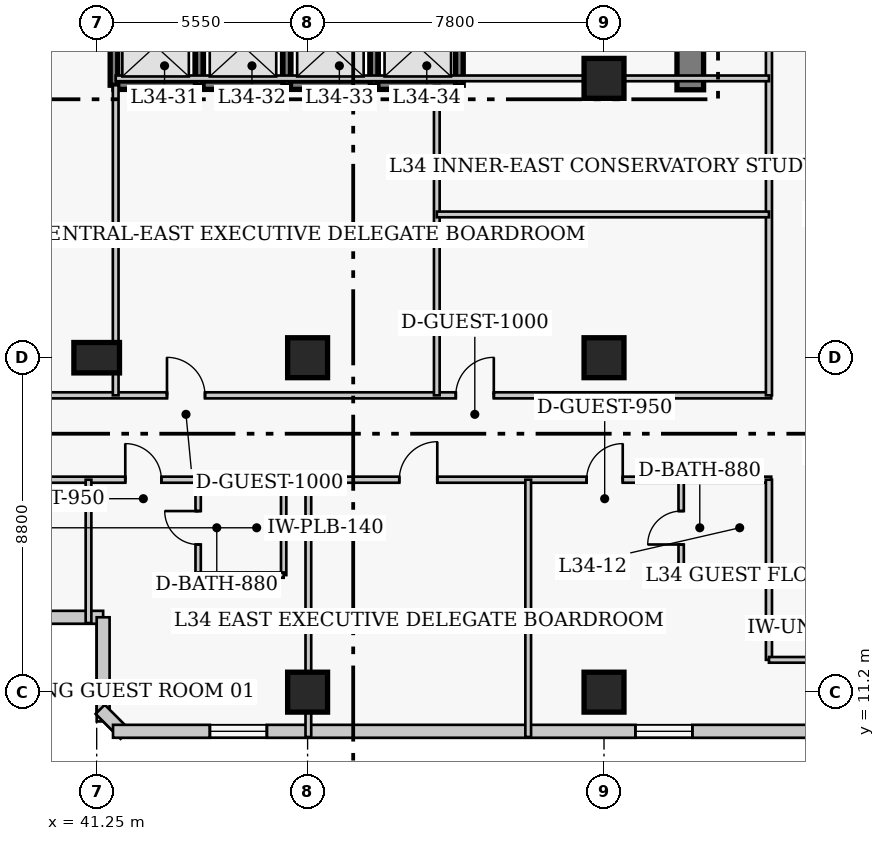
"""IFC4 building model, lengths in metres.
Left out: names, types, materials, properties, quantities, classifications, styles, units other than length and angle.
Written with IfcOpenShell. Run it as: python <this file> out.ifc"""

import sys

from ifc_helpers import new_model, si_unit, direction, frame, frame_2d, origin, origin_2d, place, context, subcontext, project, spatial, rectangle, extrude, element, fill, save


model = new_model("IFC4")
c1 = context("Model", 3, precision=1e-05, world=origin(), true_north=direction((0.0, 1.0)))
c2 = subcontext(c1, "Body", "Model", "MODEL_VIEW")
j1 = project(units=[si_unit("LENGTHUNIT", "METRE"), si_unit("PLANEANGLEUNIT", "RADIAN")], contexts=[c1])
p1 = place(None, origin())
s1 = spatial("IfcSite", under=j1, at=p1, CompositionType="ELEMENT")
p2 = place(p1, origin())
s2 = spatial("IfcBuilding", under=s1, at=p2, CompositionType="ELEMENT")
p3 = place(p2, frame((0.0, 0.0, 138.4)))
s3 = spatial("IfcBuildingStorey", under=s2, at=p3, CompositionType="ELEMENT", Elevation=138.4)
p4 = place(p3, frame((56.87, 27.05, 0.0), z_axis=(0.0, 0.0, 1.0), x_axis=(0.0, 1.0, 0.0)))
e1 = element("IfcWall", 1, at=p4, inside=s3, PredefinedType="SHEAR", context=c2, shape_type="SweptSolid", body=[
    extrude(rectangle(XDim=13.62, YDim=0.7, at=frame_2d((6.81, 0.0))), origin(), (0.0, 0.0, 1.0), 3.8),
])
p5 = place(p3, frame((41.25, 20.0, 0.0), z_axis=(0.0, 0.0, 1.0), x_axis=(1.0, 0.0, 0.0)))
e2 = element("IfcColumn", 2, at=p5, inside=s3, PredefinedType="COLUMN", context=c2, shape_type="SweptSolid", body=[
    extrude(rectangle(XDim=1.2, YDim=0.8, at=origin_2d()), origin(), (0.0, 0.0, 1.0), 3.8),
])
for number, where, z_axis, x_axis in (
    (3, (46.8, 11.2, 0.0), (0.0, 0.0, 1.0), (1.0, 0.0, 0.0)),
    (4, (46.8, 20.0, 0.0), (0.0, 0.0, 1.0), (1.0, 0.0, 0.0)),
    (5, (54.6, 11.2, 0.0), (0.0, 0.0, 1.0), (1.0, 0.0, 0.0)),
    (6, (54.6, 20.0, 0.0), (0.0, 0.0, 1.0), (1.0, 0.0, 0.0)),
    (7, (54.6, 27.35, 0.0), (0.0, 0.0, 1.0), (1.0, 0.0, 0.0)),
):
    element("IfcColumn", number, at=place(p3, frame(where, z_axis=z_axis, x_axis=x_axis)), inside=s3, PredefinedType="COLUMN", context=c2, shape_type="SweptSolid", body=[
        extrude(rectangle(XDim=1.05, YDim=1.05, at=origin_2d()), origin(), (0.0, 0.0, 1.0), 3.8),
    ])
p6 = place(p3, frame((36.58, 13.17, 0.0), z_axis=(0.0, 0.0, 1.0), x_axis=(1.0, 0.0, 0.0)))
e8 = element("IfcWall", 8, at=p6, inside=s3, PredefinedType="SOLIDWALL", context=c2, shape_type="SweptSolid", body=[
    extrude(rectangle(XDim=4.84, YDim=0.34, at=frame_2d((2.42, 0.0))), origin(), (0.0, 0.0, 1.0), 3.55),
])
p7 = place(p6, frame((1.67, 0.0, 0.85)))
e9 = element("IfcOpeningElement", 9, at=p7, cuts=e8, PredefinedType="OPENING", context=c2, shape_type="SweptSolid", body=[
    extrude(rectangle(XDim=1.5, YDim=1.75, at=frame_2d((0.75, 0.875))), frame((0.0, 0.18, 0.0), z_axis=(0.0, -1.0, 0.0), x_axis=(1.0, 0.0, 0.0)), (0.0, 0.0, 1.0), 0.36),
])
p8 = place(p3, frame((41.42, 13.17, 0.0), z_axis=(0.0, 0.0, 1.0), x_axis=(0.0, -1.0, 0.0)))
e10 = element("IfcWall", 10, at=p8, inside=s3, PredefinedType="SOLIDWALL", context=c2, shape_type="SweptSolid", body=[
    extrude(rectangle(XDim=2.74, YDim=0.34, at=frame_2d((1.37, 0.0))), origin(), (0.0, 0.0, 1.0), 3.55),
])
p9 = place(p3, frame((41.342, 10.749, 0.0), z_axis=(0.0, 0.0, 1.0), x_axis=(0.707106781187, -0.707106781187, 0.0)))
e11 = element("IfcWall", 11, at=p9, inside=s3, PredefinedType="SOLIDWALL", context=c2, shape_type="SweptSolid", body=[
    extrude(rectangle(XDim=0.929, YDim=0.34, at=frame_2d((0.464, 0.0))), origin(), (0.0, 0.0, 1.0), 3.55),
])
p10 = place(p3, frame((41.68, 10.17, 0.0), z_axis=(0.0, 0.0, 1.0), x_axis=(1.0, 0.0, 0.0)))
e12 = element("IfcWall", 12, at=p10, inside=s3, PredefinedType="SOLIDWALL", context=c2, shape_type="SweptSolid", body=[
    extrude(rectangle(XDim=26.69, YDim=0.34, at=frame_2d((13.345, 0.0))), origin(), (0.0, 0.0, 1.0), 3.55),
])
p11 = place(p10, frame((2.548, 0.0, 0.85)))
e13 = element("IfcOpeningElement", 13, at=p11, cuts=e12, PredefinedType="OPENING", context=c2, shape_type="SweptSolid", body=[
    extrude(rectangle(XDim=1.5, YDim=1.75, at=frame_2d((0.75, 0.875))), frame((0.0, 0.18, 0.0), z_axis=(0.0, -1.0, 0.0), x_axis=(1.0, 0.0, 0.0)), (0.0, 0.0, 1.0), 0.36),
])
p12 = place(p10, frame((13.745, 0.0, 0.85)))
e14 = element("IfcOpeningElement", 14, at=p12, cuts=e12, PredefinedType="OPENING", context=c2, shape_type="SweptSolid", body=[
    extrude(rectangle(XDim=1.5, YDim=1.75, at=frame_2d((0.75, 0.875))), frame((0.0, 0.18, 0.0), z_axis=(0.0, -1.0, 0.0), x_axis=(1.0, 0.0, 0.0)), (0.0, 0.0, 1.0), 0.36),
])
p13 = place(p10, frame((21.492, 0.0, 0.85)))
e15 = element("IfcOpeningElement", 15, at=p13, cuts=e12, PredefinedType="OPENING", context=c2, shape_type="SweptSolid", body=[
    extrude(rectangle(XDim=1.5, YDim=1.75, at=frame_2d((0.75, 0.875))), frame((0.0, 0.18, 0.0), z_axis=(0.0, -1.0, 0.0), x_axis=(1.0, 0.0, 0.0)), (0.0, 0.0, 1.0), 0.36),
])
p14 = place(p3, frame((41.705, 27.17, 0.0), z_axis=(0.0, 0.0, 1.0), x_axis=(1.0, 0.0, 0.0)))
e16 = element("IfcWall", 16, at=p14, inside=s3, PredefinedType="SHEAR", context=c2, shape_type="SweptSolid", body=[
    extrude(rectangle(XDim=2.245, YDim=0.22, at=frame_2d((1.123, 0.0))), origin(), (0.0, 0.0, 1.0), 3.8),
])
p15 = place(p3, frame((41.705, 27.17, 0.0), z_axis=(0.0, 0.0, 1.0), x_axis=(0.0, 1.0, 0.0)))
e17 = element("IfcWall", 17, at=p15, inside=s3, PredefinedType="SHEAR", context=c2, shape_type="SweptSolid", body=[
    extrude(rectangle(XDim=2.06, YDim=0.2, at=frame_2d((1.03, 0.0))), origin(), (0.0, 0.0, 1.0), 3.8),
])
p16 = place(p3, frame((43.95, 27.17, 0.0), z_axis=(0.0, 0.0, 1.0), x_axis=(1.0, 0.0, 0.0)))
e18 = element("IfcWall", 18, at=p16, inside=s3, PredefinedType="SHEAR", context=c2, shape_type="SweptSolid", body=[
    extrude(rectangle(XDim=2.3, YDim=0.22, at=frame_2d((1.15, 0.0))), origin(), (0.0, 0.0, 1.0), 3.8),
])
p17 = place(p3, frame((43.95, 27.17, 0.0), z_axis=(0.0, 0.0, 1.0), x_axis=(0.0, 1.0, 0.0)))
e19 = element("IfcWall", 19, at=p17, inside=s3, PredefinedType="SHEAR", context=c2, shape_type="SweptSolid", body=[
    extrude(rectangle(XDim=2.06, YDim=0.2, at=frame_2d((1.03, 0.0))), origin(), (0.0, 0.0, 1.0), 3.8),
])
p18 = place(p3, frame((46.25, 27.17, 0.0), z_axis=(0.0, 0.0, 1.0), x_axis=(1.0, 0.0, 0.0)))
e20 = element("IfcWall", 20, at=p18, inside=s3, PredefinedType="SHEAR", context=c2, shape_type="SweptSolid", body=[
    extrude(rectangle(XDim=2.3, YDim=0.22, at=frame_2d((1.15, 0.0))), origin(), (0.0, 0.0, 1.0), 3.8),
])
p19 = place(p3, frame((46.25, 27.17, 0.0), z_axis=(0.0, 0.0, 1.0), x_axis=(0.0, 1.0, 0.0)))
e21 = element("IfcWall", 21, at=p19, inside=s3, PredefinedType="SHEAR", context=c2, shape_type="SweptSolid", body=[
    extrude(rectangle(XDim=2.06, YDim=0.2, at=frame_2d((1.03, 0.0))), origin(), (0.0, 0.0, 1.0), 3.8),
])
p20 = place(p3, frame((48.55, 27.17, 0.0), z_axis=(0.0, 0.0, 1.0), x_axis=(1.0, 0.0, 0.0)))
e22 = element("IfcWall", 22, at=p20, inside=s3, PredefinedType="SHEAR", context=c2, shape_type="SweptSolid", body=[
    extrude(rectangle(XDim=2.245, YDim=0.22, at=frame_2d((1.123, 0.0))), origin(), (0.0, 0.0, 1.0), 3.8),
])
for number, where, z_axis, x_axis in (
    (23, (48.55, 27.17, 0.0), (0.0, 0.0, 1.0), (0.0, 1.0, 0.0)),
    (24, (50.795, 27.17, 0.0), (0.0, 0.0, 1.0), (0.0, 1.0, 0.0)),
):
    element("IfcWall", number, at=place(p3, frame(where, z_axis=z_axis, x_axis=x_axis)), inside=s3, PredefinedType="SHEAR", context=c2, shape_type="SweptSolid", body=[
        extrude(rectangle(XDim=2.06, YDim=0.2, at=frame_2d((1.03, 0.0))), origin(), (0.0, 0.0, 1.0), 3.8),
    ])
p21 = place(p3, frame((35.85, 19.01, 0.0), z_axis=(0.0, 0.0, 1.0), x_axis=(1.0, 0.0, 0.0)))
e25 = element("IfcWall", 25, at=p21, inside=s3, PredefinedType="PARTITIONING", context=c2, shape_type="SweptSolid", body=[
    extrude(rectangle(XDim=23.15, YDim=0.16, at=frame_2d((11.575, 0.0))), origin(), (0.0, 0.0, 1.0), 3.55),
])
p22 = place(p21, frame((7.25, 0.0, 0.0)))
e26 = element("IfcOpeningElement", 26, at=p22, cuts=e25, PredefinedType="OPENING", context=c2, shape_type="SweptSolid", body=[
    extrude(rectangle(XDim=1.0, YDim=2.15, at=frame_2d((0.5, 1.075))), frame((0.0, 0.09, 0.0), z_axis=(0.0, -1.0, 0.0), x_axis=(1.0, 0.0, 0.0)), (0.0, 0.0, 1.0), 0.18),
])
p23 = place(p21, frame((14.85, 0.0, 0.0)))
e27 = element("IfcOpeningElement", 27, at=p23, cuts=e25, PredefinedType="OPENING", context=c2, shape_type="SweptSolid", body=[
    extrude(rectangle(XDim=1.0, YDim=2.15, at=frame_2d((0.5, 1.075))), frame((0.0, 0.09, 0.0), z_axis=(0.0, -1.0, 0.0), x_axis=(1.0, 0.0, 0.0)), (0.0, 0.0, 1.0), 0.18),
])
p24 = place(p3, frame((35.8, 16.79, 0.0), z_axis=(0.0, 0.0, 1.0), x_axis=(1.0, 0.0, 0.0)))
e28 = element("IfcWall", 28, at=p24, inside=s3, PredefinedType="PARTITIONING", context=c2, shape_type="SweptSolid", body=[
    extrude(rectangle(XDim=23.2, YDim=0.16, at=frame_2d((11.6, 0.0))), origin(), (0.0, 0.0, 1.0), 3.55),
])
p25 = place(p24, frame((6.202, 0.0, 0.0)))
e29 = element("IfcOpeningElement", 29, at=p25, cuts=e28, PredefinedType="OPENING", context=c2, shape_type="SweptSolid", body=[
    extrude(rectangle(XDim=0.95, YDim=2.1, at=frame_2d((0.475, 1.05))), frame((0.0, 0.09, 0.0), z_axis=(0.0, -1.0, 0.0), x_axis=(1.0, 0.0, 0.0)), (0.0, 0.0, 1.0), 0.18),
])
p26 = place(p24, frame((13.413, 0.0, 0.0)))
e30 = element("IfcOpeningElement", 30, at=p26, cuts=e28, PredefinedType="OPENING", context=c2, shape_type="SweptSolid", body=[
    extrude(rectangle(XDim=1.0, YDim=2.15, at=frame_2d((0.5, 1.075))), frame((0.0, 0.09, 0.0), z_axis=(0.0, -1.0, 0.0), x_axis=(1.0, 0.0, 0.0)), (0.0, 0.0, 1.0), 0.18),
])
p27 = place(p24, frame((18.343, 0.0, 0.0)))
e31 = element("IfcOpeningElement", 31, at=p27, cuts=e28, PredefinedType="OPENING", context=c2, shape_type="SweptSolid", body=[
    extrude(rectangle(XDim=0.95, YDim=2.1, at=frame_2d((0.475, 1.05))), frame((0.0, 0.09, 0.0), z_axis=(0.0, -1.0, 0.0), x_axis=(1.0, 0.0, 0.0)), (0.0, 0.0, 1.0), 0.18),
])
p28 = place(p3, frame((58.94, 19.01, 0.0), z_axis=(0.0, 0.0, 1.0), x_axis=(0.0, 1.0, 0.0)))
e32 = element("IfcWall", 32, at=p28, inside=s3, PredefinedType="PARTITIONING", context=c2, shape_type="SweptSolid", body=[
    extrude(rectangle(XDim=21.64, YDim=0.16, at=frame_2d((10.82, 0.0))), origin(), (0.0, 0.0, 1.0), 3.55),
])
p29 = place(p3, frame((58.94, 12.05, 0.0), z_axis=(0.0, 0.0, 1.0), x_axis=(0.0, 1.0, 0.0)))
e33 = element("IfcWall", 33, at=p29, inside=s3, PredefinedType="PARTITIONING", context=c2, shape_type="SweptSolid", body=[
    extrude(rectangle(XDim=4.74, YDim=0.16, at=frame_2d((2.37, 0.0))), origin(), (0.0, 0.0, 1.0), 3.55),
])
p30 = place(p3, frame((58.94, 12.05, 0.0), z_axis=(0.0, 0.0, 1.0), x_axis=(1.0, 0.0, 0.0)))
e34 = element("IfcWall", 34, at=p30, inside=s3, PredefinedType="PARTITIONING", context=c2, shape_type="SweptSolid", body=[
    extrude(rectangle(XDim=2.22, YDim=0.15, at=frame_2d((1.11, 0.0))), origin(), (0.0, 0.0, 1.0), 3.55),
])
p31 = place(p3, frame((41.75, 19.01, 0.0), z_axis=(0.0, 0.0, 1.0), x_axis=(0.0, 1.0, 0.0)))
e35 = element("IfcWall", 35, at=p31, inside=s3, PredefinedType="PARTITIONING", context=c2, shape_type="SweptSolid", body=[
    extrude(rectangle(XDim=8.16, YDim=0.15, at=frame_2d((4.08, 0.0))), origin(), (0.0, 0.0, 1.0), 3.55),
])
p32 = place(p3, frame((50.2, 19.01, 0.0), z_axis=(0.0, 0.0, 1.0), x_axis=(0.0, 1.0, 0.0)))
e36 = element("IfcWall", 36, at=p32, inside=s3, PredefinedType="PARTITIONING", context=c2, shape_type="SweptSolid", body=[
    extrude(rectangle(XDim=8.14, YDim=0.15, at=frame_2d((4.07, 0.0))), origin(), (0.0, 0.0, 1.0), 3.55),
])
p33 = place(p3, frame((41.75, 27.35, 0.0), z_axis=(0.0, 0.0, 1.0), x_axis=(1.0, 0.0, 0.0)))
e37 = element("IfcWall", 37, at=p33, inside=s3, PredefinedType="PARTITIONING", context=c2, shape_type="SweptSolid", body=[
    extrude(rectangle(XDim=17.19, YDim=0.15, at=frame_2d((8.595, 0.0))), origin(), (0.0, 0.0, 1.0), 3.55),
])
p34 = place(p3, frame((50.2, 23.77, 0.0), z_axis=(0.0, 0.0, 1.0), x_axis=(1.0, 0.0, 0.0)))
e38 = element("IfcWall", 38, at=p34, inside=s3, PredefinedType="PARTITIONING", context=c2, shape_type="SweptSolid", body=[
    extrude(rectangle(XDim=8.74, YDim=0.15, at=frame_2d((4.37, 0.0))), origin(), (0.0, 0.0, 1.0), 3.55),
])
p35 = place(p3, frame((41.035, 13.02, 0.0), z_axis=(0.0, 0.0, 1.0), x_axis=(0.0, 1.0, 0.0)))
e39 = element("IfcWall", 39, at=p35, inside=s3, PredefinedType="PARTITIONING", context=c2, shape_type="SweptSolid", body=[
    extrude(rectangle(XDim=3.77, YDim=0.15, at=frame_2d((1.885, 0.0))), origin(), (0.0, 0.0, 1.0), 3.55),
])
p36 = place(p3, frame((43.92, 14.28, 0.0), z_axis=(0.0, 0.0, 1.0), x_axis=(0.0, 1.0, 0.0)))
e40 = element("IfcWall", 40, at=p36, inside=s3, PredefinedType="PLUMBINGWALL", context=c2, shape_type="SweptSolid", body=[
    extrude(rectangle(XDim=2.49, YDim=0.14, at=frame_2d((1.245, 0.0))), origin(), (0.0, 0.0, 1.0), 3.55),
])
p37 = place(p36, frame((0.805, 0.0, 0.0)))
e41 = element("IfcOpeningElement", 41, at=p37, cuts=e40, PredefinedType="OPENING", context=c2, shape_type="SweptSolid", body=[
    extrude(rectangle(XDim=0.88, YDim=2.05, at=frame_2d((0.44, 1.025))), frame((0.0, 0.08, 0.0), z_axis=(0.0, -1.0, 0.0), x_axis=(1.0, 0.0, 0.0)), (0.0, 0.0, 1.0), 0.16),
])
p38 = place(p3, frame((46.17, 14.28, 0.0), z_axis=(0.0, 0.0, 1.0), x_axis=(0.0, 1.0, 0.0)))
e42 = element("IfcWall", 42, at=p38, inside=s3, PredefinedType="PLUMBINGWALL", context=c2, shape_type="SweptSolid", body=[
    extrude(rectangle(XDim=2.49, YDim=0.14, at=frame_2d((1.245, 0.0))), origin(), (0.0, 0.0, 1.0), 3.55),
])
p39 = place(p3, frame((43.92, 14.28, 0.0), z_axis=(0.0, 0.0, 1.0), x_axis=(1.0, 0.0, 0.0)))
e43 = element("IfcWall", 43, at=p39, inside=s3, PredefinedType="PLUMBINGWALL", context=c2, shape_type="SweptSolid", body=[
    extrude(rectangle(XDim=2.25, YDim=0.14, at=frame_2d((1.125, 0.0))), origin(), (0.0, 0.0, 1.0), 3.55),
])
p40 = place(p3, frame((46.82, 10.02, 0.0), z_axis=(0.0, 0.0, 1.0), x_axis=(0.0, 1.0, 0.0)))
e44 = element("IfcWall", 44, at=p40, inside=s3, PredefinedType="PARTITIONING", context=c2, shape_type="SweptSolid", body=[
    extrude(rectangle(XDim=6.77, YDim=0.15, at=frame_2d((3.385, 0.0))), origin(), (0.0, 0.0, 1.0), 2.9),
])
p41 = place(p3, frame((52.605, 10.02, 0.0), z_axis=(0.0, 0.0, 1.0), x_axis=(0.0, 1.0, 0.0)))
e45 = element("IfcWall", 45, at=p41, inside=s3, PredefinedType="PARTITIONING", context=c2, shape_type="SweptSolid", body=[
    extrude(rectangle(XDim=6.77, YDim=0.15, at=frame_2d((3.385, 0.0))), origin(), (0.0, 0.0, 1.0), 3.55),
])
p42 = place(p3, frame((56.63, 14.28, 0.0), z_axis=(0.0, 0.0, 1.0), x_axis=(0.0, 1.0, 0.0)))
e46 = element("IfcWall", 46, at=p42, inside=s3, PredefinedType="PLUMBINGWALL", context=c2, shape_type="SweptSolid", body=[
    extrude(rectangle(XDim=2.49, YDim=0.14, at=frame_2d((1.245, 0.0))), origin(), (0.0, 0.0, 1.0), 3.55),
])
p43 = place(p42, frame((0.805, 0.0, 0.0)))
e47 = element("IfcOpeningElement", 47, at=p43, cuts=e46, PredefinedType="OPENING", context=c2, shape_type="SweptSolid", body=[
    extrude(rectangle(XDim=0.88, YDim=2.05, at=frame_2d((0.44, 1.025))), frame((0.0, 0.08, 0.0), z_axis=(0.0, -1.0, 0.0), x_axis=(1.0, 0.0, 0.0)), (0.0, 0.0, 1.0), 0.16),
])
p44 = place(p3, frame((56.63, 14.28, 0.0), z_axis=(0.0, 0.0, 1.0), x_axis=(1.0, 0.0, 0.0)))
e48 = element("IfcWall", 48, at=p44, inside=s3, PredefinedType="PLUMBINGWALL", context=c2, shape_type="SweptSolid", body=[
    extrude(rectangle(XDim=2.25, YDim=0.14, at=frame_2d((1.125, 0.0))), origin(), (0.0, 0.0, 1.0), 3.55),
])
p45 = place(p11, origin())
e49 = element("IfcWindow", 49, at=p45, inside=s3, PartitioningType="SINGLE_PANEL", PredefinedType="WINDOW", context=c2, shape_type="SweptSolid", body=[
    extrude(rectangle(XDim=1.5, YDim=1.75, at=frame_2d((0.75, 0.875))), frame((0.0, 0.03, 0.0), z_axis=(0.0, -1.0, 0.0), x_axis=(1.0, 0.0, 0.0)), (0.0, 0.0, 1.0), 0.06),
])
fill(e13, e49)
p46 = place(p12, origin())
e50 = element("IfcWindow", 50, at=p46, inside=s3, PartitioningType="SINGLE_PANEL", PredefinedType="WINDOW", context=c2, shape_type="SweptSolid", body=[
    extrude(rectangle(XDim=1.5, YDim=1.75, at=frame_2d((0.75, 0.875))), frame((0.0, 0.03, 0.0), z_axis=(0.0, -1.0, 0.0), x_axis=(1.0, 0.0, 0.0)), (0.0, 0.0, 1.0), 0.06),
])
fill(e14, e50)
p47 = place(p22, origin())
e51 = element("IfcDoor", 51, at=p47, inside=s3, OperationType="SINGLE_SWING_LEFT", PredefinedType="DOOR", context=c2, shape_type="SweptSolid", body=[
    extrude(rectangle(XDim=1.0, YDim=2.15, at=frame_2d((0.5, 1.075))), frame((0.0, 0.025, 0.0), z_axis=(0.0, -1.0, 0.0), x_axis=(1.0, 0.0, 0.0)), (0.0, 0.0, 1.0), 0.05),
])
fill(e26, e51)
p48 = place(p23, origin())
e52 = element("IfcDoor", 52, at=p48, inside=s3, OperationType="SINGLE_SWING_RIGHT", PredefinedType="DOOR", context=c2, shape_type="SweptSolid", body=[
    extrude(rectangle(XDim=1.0, YDim=2.15, at=frame_2d((0.5, 1.075))), frame((0.0, 0.025, 0.0), z_axis=(0.0, -1.0, 0.0), x_axis=(1.0, 0.0, 0.0)), (0.0, 0.0, 1.0), 0.05),
])
fill(e27, e52)
p49 = place(p37, origin())
e53 = element("IfcDoor", 53, at=p49, inside=s3, OperationType="SINGLE_SWING_RIGHT", PredefinedType="DOOR", context=c2, shape_type="SweptSolid", body=[
    extrude(rectangle(XDim=0.88, YDim=2.05, at=frame_2d((0.44, 1.025))), frame((0.0, 0.025, 0.0), z_axis=(0.0, -1.0, 0.0), x_axis=(1.0, 0.0, 0.0)), (0.0, 0.0, 1.0), 0.05),
])
fill(e41, e53)
p50 = place(p25, origin())
e54 = element("IfcDoor", 54, at=p50, inside=s3, OperationType="SINGLE_SWING_LEFT", PredefinedType="DOOR", context=c2, shape_type="SweptSolid", body=[
    extrude(rectangle(XDim=0.95, YDim=2.1, at=frame_2d((0.475, 1.05))), frame((0.0, 0.025, 0.0), z_axis=(0.0, -1.0, 0.0), x_axis=(1.0, 0.0, 0.0)), (0.0, 0.0, 1.0), 0.05),
])
fill(e29, e54)
p51 = place(p26, origin())
e55 = element("IfcDoor", 55, at=p51, inside=s3, OperationType="SINGLE_SWING_RIGHT", PredefinedType="DOOR", context=c2, shape_type="SweptSolid", body=[
    extrude(rectangle(XDim=1.0, YDim=2.15, at=frame_2d((0.5, 1.075))), frame((0.0, 0.025, 0.0), z_axis=(0.0, -1.0, 0.0), x_axis=(1.0, 0.0, 0.0)), (0.0, 0.0, 1.0), 0.05),
])
fill(e30, e55)
p52 = place(p43, origin())
e56 = element("IfcDoor", 56, at=p52, inside=s3, OperationType="SINGLE_SWING_LEFT", PredefinedType="DOOR", context=c2, shape_type="SweptSolid", body=[
    extrude(rectangle(XDim=0.88, YDim=2.05, at=frame_2d((0.44, 1.025))), frame((0.0, 0.025, 0.0), z_axis=(0.0, -1.0, 0.0), x_axis=(1.0, 0.0, 0.0)), (0.0, 0.0, 1.0), 0.05),
])
fill(e47, e56)
p53 = place(p27, origin())
e57 = element("IfcDoor", 57, at=p53, inside=s3, OperationType="SINGLE_SWING_RIGHT", PredefinedType="DOOR", context=c2, shape_type="SweptSolid", body=[
    extrude(rectangle(XDim=0.95, YDim=2.1, at=frame_2d((0.475, 1.05))), frame((0.0, 0.025, 0.0), z_axis=(0.0, -1.0, 0.0), x_axis=(1.0, 0.0, 0.0)), (0.0, 0.0, 1.0), 0.05),
])
fill(e31, e57)
save(model, sys.argv[1])
